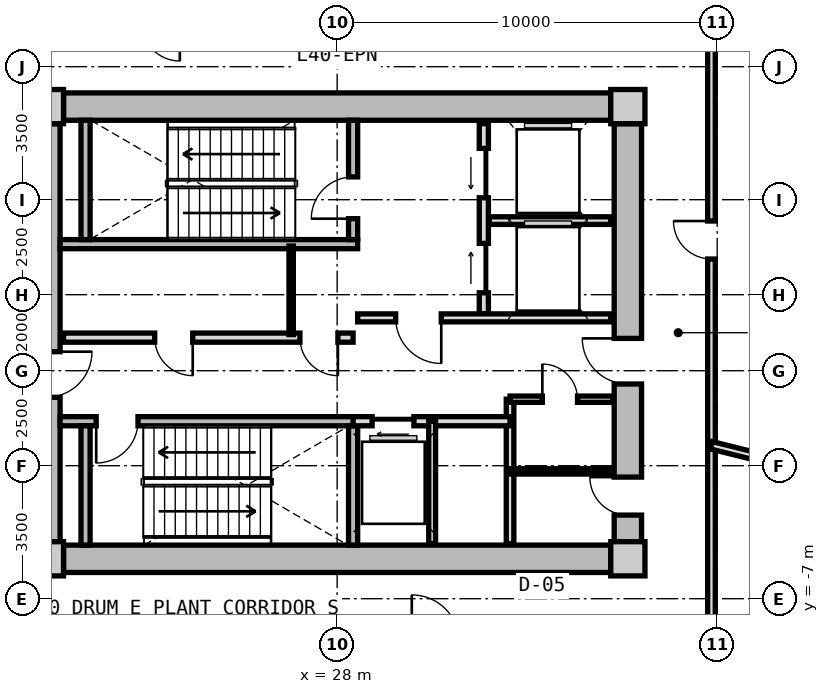
"""IFC4 building model, lengths in metres.
Left out: names, types, materials, properties, quantities, classifications, styles, units other than length and angle.
Written with IfcOpenShell. Run it as: python <this file> out.ifc"""

import sys

from ifc_helpers import new_model, si_unit, direction, frame, frame_2d, origin, origin_2d, place, context, subcontext, project, spatial, rectangle, extrude, source, transform, mapped, element, fill, save


model = new_model("IFC4")
c1 = context("Model", 3, precision=1e-05, world=origin(), true_north=direction((0.0, 1.0)))
c2 = subcontext(c1, "Body", "Model", "MODEL_VIEW")
j1 = project(units=[si_unit("LENGTHUNIT", "METRE"), si_unit("PLANEANGLEUNIT", "RADIAN")], contexts=[c1])
p1 = place(None, origin())
s1 = spatial("IfcSite", under=j1, at=p1, CompositionType="ELEMENT")
p2 = place(p1, origin())
s2 = spatial("IfcBuilding", under=s1, at=p2, CompositionType="ELEMENT")
p3 = place(p2, frame((0.0, 0.0, 129.8)))
s3 = spatial("IfcBuildingStorey", under=s2, at=p3, CompositionType="ELEMENT", Elevation=129.8)
m1 = source(origin(), c2, "Body", "SweptSolid", [
    extrude(rectangle(XDim=0.9, YDim=0.9, at=origin_2d()), origin(), (0.0, 0.0, 1.0), 4.5),
])
for number, where, z_axis, x_axis in (
    (1, (20.35, -5.95, 0.0), (0.0, 0.0, 1.0), (1.0, 0.0, 0.0)),
    (2, (35.65, -5.95, 0.0), (0.0, 0.0, 1.0), (1.0, 0.0, 0.0)),
    (3, (35.65, 5.95, 0.0), (0.0, 0.0, 1.0), (1.0, 0.0, 0.0)),
    (4, (20.35, 5.95, 0.0), (0.0, 0.0, 1.0), (1.0, 0.0, 0.0)),
):
    element("IfcColumn", number, at=place(p3, frame(where, z_axis=z_axis, x_axis=x_axis)), inside=s3, PredefinedType="COLUMN", context=c2, shape_type="MappedRepresentation", body=[
        mapped(m1, transform((0.0, 0.0, 0.0), x_axis=(1.0, 0.0, 0.0), y_axis=(0.0, 1.0, 0.0), z_axis=(0.0, 0.0, 1.0), scale=1.0)),
    ])
m2 = source(origin(), c2, "Body", "SweptSolid", [
    extrude(rectangle(XDim=14.4, YDim=0.72, at=frame_2d((7.2, 0.0))), origin(), (0.0, 0.0, 1.0), 4.08),
])
for number, where, z_axis, x_axis in (
    (5, (20.8, 5.95, 0.0), (0.0, 0.0, 1.0), (1.0, 0.0, 0.0)),
    (6, (35.2, -5.95, 0.0), (0.0, 0.0, 1.0), (-1.0, 0.0, 0.0)),
):
    element("IfcWall", number, at=place(p3, frame(where, z_axis=z_axis, x_axis=x_axis)), inside=s3, PredefinedType="SHEAR", context=c2, shape_type="MappedRepresentation", body=[
        mapped(m2, transform((0.0, 0.0, 0.0), x_axis=(1.0, 0.0, 0.0), y_axis=(0.0, 1.0, 0.0), z_axis=(0.0, 0.0, 1.0), scale=1.0)),
    ])
m3 = source(origin(), c2, "Body", "SweptSolid", [
    extrude(rectangle(XDim=11.0, YDim=0.72, at=frame_2d((5.5, 0.0))), origin(), (0.0, 0.0, 1.0), 4.08),
])
p4 = place(p3, frame((20.35, -5.5, 0.0), z_axis=(0.0, 0.0, 1.0), x_axis=(0.0, 1.0, 0.0)))
e7 = element("IfcWall", 7, at=p4, inside=s3, PredefinedType="SHEAR", context=c2, shape_type="MappedRepresentation", body=[
    mapped(m3, transform((0.0, 0.0, 0.0), x_axis=(1.0, 0.0, 0.0), y_axis=(0.0, 1.0, 0.0), z_axis=(0.0, 0.0, 1.0), scale=1.0)),
])
p5 = place(p4, frame((3.8, 0.0, 0.0)))
e8 = element("IfcOpeningElement", 8, at=p5, cuts=e7, PredefinedType="OPENING", context=c2, shape_type="SweptSolid", body=[
    extrude(rectangle(XDim=1.2, YDim=2.15, at=frame_2d((0.6, 1.075))), frame((0.0, 0.37, 0.0), z_axis=(0.0, -1.0, 0.0), x_axis=(1.0, 0.0, 0.0)), (0.0, 0.0, 1.0), 0.74),
])
p6 = place(p3, frame((35.65, 5.5, 0.0), z_axis=(0.0, 0.0, 1.0), x_axis=(0.0, -1.0, 0.0)))
e9 = element("IfcWall", 9, at=p6, inside=s3, PredefinedType="SHEAR", context=c2, shape_type="MappedRepresentation", body=[
    mapped(m3, transform((0.0, 0.0, 0.0), x_axis=(1.0, 0.0, 0.0), y_axis=(0.0, 1.0, 0.0), z_axis=(0.0, 0.0, 1.0), scale=1.0)),
])
p7 = place(p6, frame((5.65, 0.0, 0.0)))
e10 = element("IfcOpeningElement", 10, at=p7, cuts=e9, PredefinedType="OPENING", context=c2, shape_type="SweptSolid", body=[
    extrude(rectangle(XDim=1.2, YDim=2.15, at=frame_2d((0.6, 1.075))), frame((0.0, 0.37, 0.0), z_axis=(0.0, -1.0, 0.0), x_axis=(1.0, 0.0, 0.0)), (0.0, 0.0, 1.0), 0.74),
])
p8 = place(p6, frame((9.3, 0.0, 0.0)))
e11 = element("IfcOpeningElement", 11, at=p8, cuts=e9, PredefinedType="OPENING", context=c2, shape_type="SweptSolid", body=[
    extrude(rectangle(XDim=1.0, YDim=2.1, at=frame_2d((0.5, 1.05))), frame((0.0, 0.37, 0.0), z_axis=(0.0, -1.0, 0.0), x_axis=(1.0, 0.0, 0.0)), (0.0, 0.0, 1.0), 0.74),
])
m4 = source(origin(), c2, "Body", "SweptSolid", [
    extrude(rectangle(XDim=7.83, YDim=0.24, at=frame_2d((3.915, 0.0))), origin(), (0.0, 0.0, 1.0), 4.08),
])
p9 = place(p3, frame((20.71, 2.33, 0.0), z_axis=(0.0, 0.0, 1.0), x_axis=(1.0, 0.0, 0.0)))
e12 = element("IfcWall", 12, at=p9, inside=s3, PredefinedType="PARTITIONING", context=c2, shape_type="MappedRepresentation", body=[
    mapped(m4, transform((0.0, 0.0, 0.0), x_axis=(1.0, 0.0, 0.0), y_axis=(0.0, 1.0, 0.0), z_axis=(0.0, 0.0, 1.0), scale=1.0)),
])
m5 = source(origin(), c2, "Body", "SweptSolid", [
    extrude(rectangle(XDim=3.14, YDim=0.24, at=frame_2d((1.57, 0.0))), origin(), (0.0, 0.0, 1.0), 4.08),
])
p10 = place(p3, frame((21.38, 2.45, 0.0), z_axis=(0.0, 0.0, 1.0), x_axis=(0.0, 1.0, 0.0)))
e13 = element("IfcWall", 13, at=p10, inside=s3, PredefinedType="PARTITIONING", context=c2, shape_type="MappedRepresentation", body=[
    mapped(m5, transform((0.0, 0.0, 0.0), x_axis=(1.0, 0.0, 0.0), y_axis=(0.0, 1.0, 0.0), z_axis=(0.0, 0.0, 1.0), scale=1.0)),
])
p11 = place(p3, frame((28.42, 2.45, 0.0), z_axis=(0.0, 0.0, 1.0), x_axis=(0.0, 1.0, 0.0)))
e14 = element("IfcWall", 14, at=p11, inside=s3, PredefinedType="PARTITIONING", context=c2, shape_type="MappedRepresentation", body=[
    mapped(m5, transform((0.0, 0.0, 0.0), x_axis=(1.0, 0.0, 0.0), y_axis=(0.0, 1.0, 0.0), z_axis=(0.0, 0.0, 1.0), scale=1.0)),
])
p12 = place(p11, frame((0.55, 0.0, 0.0)))
e15 = element("IfcOpeningElement", 15, at=p12, cuts=e14, PredefinedType="OPENING", context=c2, shape_type="SweptSolid", body=[
    extrude(rectangle(XDim=1.1, YDim=2.15, at=frame_2d((0.55, 1.075))), frame((0.0, 0.13, 0.0), z_axis=(0.0, -1.0, 0.0), x_axis=(1.0, 0.0, 0.0)), (0.0, 0.0, 1.0), 0.26),
])
p13 = place(p3, frame((20.71, -2.33, 0.0), z_axis=(0.0, 0.0, 1.0), x_axis=(1.0, 0.0, 0.0)))
e16 = element("IfcWall", 16, at=p13, inside=s3, PredefinedType="PARTITIONING", context=c2, shape_type="MappedRepresentation", body=[
    mapped(m4, transform((0.0, 0.0, 0.0), x_axis=(1.0, 0.0, 0.0), y_axis=(0.0, 1.0, 0.0), z_axis=(0.0, 0.0, 1.0), scale=1.0)),
])
p14 = place(p13, frame((0.95, 0.0, 0.0)))
e17 = element("IfcOpeningElement", 17, at=p14, cuts=e16, PredefinedType="OPENING", context=c2, shape_type="SweptSolid", body=[
    extrude(rectangle(XDim=1.1, YDim=2.15, at=frame_2d((0.55, 1.075))), frame((0.0, 0.13, 0.0), z_axis=(0.0, -1.0, 0.0), x_axis=(1.0, 0.0, 0.0)), (0.0, 0.0, 1.0), 0.26),
])
for number, where, z_axis, x_axis in (
    (18, (21.38, -5.59, 0.0), (0.0, 0.0, 1.0), (0.0, 1.0, 0.0)),
    (19, (28.42, -5.59, 0.0), (0.0, 0.0, 1.0), (0.0, 1.0, 0.0)),
):
    element("IfcWall", number, at=place(p3, frame(where, z_axis=z_axis, x_axis=x_axis)), inside=s3, PredefinedType="PARTITIONING", context=c2, shape_type="MappedRepresentation", body=[
        mapped(m5, transform((0.0, 0.0, 0.0), x_axis=(1.0, 0.0, 0.0), y_axis=(0.0, 1.0, 0.0), z_axis=(0.0, 0.0, 1.0), scale=1.0)),
    ])
m6 = source(origin(), c2, "Body", "SweptSolid", [
    extrude(rectangle(XDim=5.0, YDim=0.24, at=frame_2d((2.5, 0.0))), origin(), (0.0, 0.0, 1.0), 4.065),
])
p15 = place(p3, frame((31.86, 0.5, 0.0), z_axis=(0.0, 0.0, 1.0), x_axis=(0.0, 1.0, 0.0)))
e20 = element("IfcWall", 20, at=p15, inside=s3, PredefinedType="PARTITIONING", context=c2, shape_type="MappedRepresentation", body=[
    mapped(m6, transform((0.0, 0.0, 0.0), x_axis=(1.0, 0.0, 0.0), y_axis=(0.0, 1.0, 0.0), z_axis=(0.0, 0.0, 1.0), scale=1.0)),
])
p16 = place(p15, frame((3.05, 0.0, 0.0)))
e21 = element("IfcOpeningElement", 21, at=p16, cuts=e20, PredefinedType="OPENING", context=c2, shape_type="SweptSolid", body=[
    extrude(rectangle(XDim=1.3, YDim=2.2, at=frame_2d((0.65, 1.1))), frame((0.0, 0.13, 0.0), z_axis=(0.0, -1.0, 0.0), x_axis=(1.0, 0.0, 0.0)), (0.0, 0.0, 1.0), 0.26),
])
p17 = place(p15, frame((0.55, 0.0, 0.0)))
e22 = element("IfcOpeningElement", 22, at=p17, cuts=e20, PredefinedType="OPENING", context=c2, shape_type="SweptSolid", body=[
    extrude(rectangle(XDim=1.3, YDim=2.2, at=frame_2d((0.65, 1.1))), frame((0.0, 0.13, 0.0), z_axis=(0.0, -1.0, 0.0), x_axis=(1.0, 0.0, 0.0)), (0.0, 0.0, 1.0), 0.26),
])
m7 = source(origin(), c2, "Body", "SweptSolid", [
    extrude(rectangle(XDim=3.2, YDim=0.2, at=frame_2d((1.6, 0.0))), origin(), (0.0, 0.0, 1.0), 4.065),
])
p18 = place(p3, frame((32.0, 2.95, 0.0), z_axis=(0.0, 0.0, 1.0), x_axis=(1.0, 0.0, 0.0)))
e23 = element("IfcWall", 23, at=p18, inside=s3, PredefinedType="PARTITIONING", context=c2, shape_type="MappedRepresentation", body=[
    mapped(m7, transform((0.0, 0.0, 0.0), x_axis=(1.0, 0.0, 0.0), y_axis=(0.0, 1.0, 0.0), z_axis=(0.0, 0.0, 1.0), scale=1.0)),
])
m8 = source(origin(), c2, "Body", "SweptSolid", [
    extrude(rectangle(XDim=6.66, YDim=0.21, at=frame_2d((3.33, 0.0))), origin(), (0.0, 0.0, 1.0), 4.065),
])
p19 = place(p3, frame((28.54, 0.39, 0.0), z_axis=(0.0, 0.0, 1.0), x_axis=(1.0, 0.0, 0.0)))
e24 = element("IfcWall", 24, at=p19, inside=s3, PredefinedType="PARTITIONING", context=c2, shape_type="MappedRepresentation", body=[
    mapped(m8, transform((0.0, 0.0, 0.0), x_axis=(1.0, 0.0, 0.0), y_axis=(0.0, 1.0, 0.0), z_axis=(0.0, 0.0, 1.0), scale=1.0)),
])
p20 = place(p19, frame((1.0, 0.0, 0.0)))
e25 = element("IfcOpeningElement", 25, at=p20, cuts=e24, PredefinedType="OPENING", context=c2, shape_type="SweptSolid", body=[
    extrude(rectangle(XDim=1.2, YDim=2.15, at=frame_2d((0.6, 1.075))), frame((0.0, 0.115, 0.0), z_axis=(0.0, -1.0, 0.0), x_axis=(1.0, 0.0, 0.0)), (0.0, 0.0, 1.0), 0.23),
])
m9 = source(origin(), c2, "Body", "SweptSolid", [
    extrude(rectangle(XDim=7.62, YDim=0.24, at=frame_2d((3.81, 0.0))), origin(), (0.0, 0.0, 1.0), 4.065),
])
p21 = place(p3, frame((20.8, -0.13, 0.0), z_axis=(0.0, 0.0, 1.0), x_axis=(1.0, 0.0, 0.0)))
e26 = element("IfcWall", 26, at=p21, inside=s3, PredefinedType="PARTITIONING", context=c2, shape_type="MappedRepresentation", body=[
    mapped(m9, transform((0.0, 0.0, 0.0), x_axis=(1.0, 0.0, 0.0), y_axis=(0.0, 1.0, 0.0), z_axis=(0.0, 0.0, 1.0), scale=1.0)),
])
p22 = place(p21, frame((6.22, 0.0, 0.0)))
e27 = element("IfcOpeningElement", 27, at=p22, cuts=e26, PredefinedType="OPENING", context=c2, shape_type="SweptSolid", body=[
    extrude(rectangle(XDim=1.0, YDim=2.1, at=frame_2d((0.5, 1.05))), frame((0.0, 0.13, 0.0), z_axis=(0.0, -1.0, 0.0), x_axis=(1.0, 0.0, 0.0)), (0.0, 0.0, 1.0), 0.26),
])
p23 = place(p21, frame((2.4, 0.0, 0.0)))
e28 = element("IfcOpeningElement", 28, at=p23, cuts=e26, PredefinedType="OPENING", context=c2, shape_type="SweptSolid", body=[
    extrude(rectangle(XDim=1.0, YDim=2.1, at=frame_2d((0.5, 1.05))), frame((0.0, 0.13, 0.0), z_axis=(0.0, -1.0, 0.0), x_axis=(1.0, 0.0, 0.0)), (0.0, 0.0, 1.0), 0.26),
])
m10 = source(origin(), c2, "Body", "SweptSolid", [
    extrude(rectangle(XDim=2.33, YDim=0.115, at=frame_2d((1.165, 0.0))), origin(), (0.0, 0.0, 1.0), 4.065),
])
p24 = place(p3, frame((26.79, -0.05, 0.0), z_axis=(0.0, 0.0, 1.0), x_axis=(0.0, 1.0, 0.0)))
e29 = element("IfcWall", 29, at=p24, inside=s3, PredefinedType="PARTITIONING", context=c2, shape_type="MappedRepresentation", body=[
    mapped(m10, transform((0.0, 0.0, 0.0), x_axis=(1.0, 0.0, 0.0), y_axis=(0.0, 1.0, 0.0), z_axis=(0.0, 0.0, 1.0), scale=1.0)),
])
m11 = source(origin(), c2, "Body", "SweptSolid", [
    extrude(rectangle(XDim=3.8, YDim=0.2, at=frame_2d((1.9, 0.0))), origin(), (0.0, 0.0, 1.0), 4.065),
])
p25 = place(p3, frame((32.55, -5.55, 0.0), z_axis=(0.0, 0.0, 1.0), x_axis=(0.0, 1.0, 0.0)))
e30 = element("IfcWall", 30, at=p25, inside=s3, PredefinedType="PARTITIONING", context=c2, shape_type="MappedRepresentation", body=[
    mapped(m11, transform((0.0, 0.0, 0.0), x_axis=(1.0, 0.0, 0.0), y_axis=(0.0, 1.0, 0.0), z_axis=(0.0, 0.0, 1.0), scale=1.0)),
])
m12 = source(origin(), c2, "Body", "SweptSolid", [
    extrude(rectangle(XDim=4.13, YDim=0.24, at=frame_2d((2.065, 0.0))), origin(), (0.0, 0.0, 1.0), 4.065),
])
p26 = place(p3, frame((28.42, -2.33, 0.0), z_axis=(0.0, 0.0, 1.0), x_axis=(1.0, 0.0, 0.0)))
e31 = element("IfcWall", 31, at=p26, inside=s3, PredefinedType="PARTITIONING", context=c2, shape_type="MappedRepresentation", body=[
    mapped(m12, transform((0.0, 0.0, 0.0), x_axis=(1.0, 0.0, 0.0), y_axis=(0.0, 1.0, 0.0), z_axis=(0.0, 0.0, 1.0), scale=1.0)),
])
p27 = place(p26, frame((0.5, 0.0, 0.0)))
e32 = element("IfcOpeningElement", 32, at=p27, cuts=e31, PredefinedType="OPENING", context=c2, shape_type="SweptSolid", body=[
    extrude(rectangle(XDim=1.1, YDim=2.2, at=frame_2d((0.55, 1.1))), frame((0.0, 0.13, 0.0), z_axis=(0.0, -1.0, 0.0), x_axis=(1.0, 0.0, 0.0)), (0.0, 0.0, 1.0), 0.26),
])
m13 = source(origin(), c2, "Body", "SweptSolid", [
    extrude(rectangle(XDim=3.22, YDim=0.18, at=frame_2d((1.61, 0.0))), origin(), (0.0, 0.0, 1.0), 4.065),
])
p28 = place(p3, frame((30.5, -5.55, 0.0), z_axis=(0.0, 0.0, 1.0), x_axis=(0.0, 1.0, 0.0)))
e33 = element("IfcWall", 33, at=p28, inside=s3, PredefinedType="PARTITIONING", context=c2, shape_type="MappedRepresentation", body=[
    mapped(m13, transform((0.0, 0.0, 0.0), x_axis=(1.0, 0.0, 0.0), y_axis=(0.0, 1.0, 0.0), z_axis=(0.0, 0.0, 1.0), scale=1.0)),
])
m14 = source(origin(), c2, "Body", "SweptSolid", [
    extrude(rectangle(XDim=2.7, YDim=0.165, at=frame_2d((1.35, 0.0))), origin(), (0.0, 0.0, 1.0), 4.065),
])
p29 = place(p3, frame((32.55, -1.75, 0.0), z_axis=(0.0, 0.0, 1.0), x_axis=(1.0, 0.0, 0.0)))
e34 = element("IfcWall", 34, at=p29, inside=s3, PredefinedType="PARTITIONING", context=c2, shape_type="MappedRepresentation", body=[
    mapped(m14, transform((0.0, 0.0, 0.0), x_axis=(1.0, 0.0, 0.0), y_axis=(0.0, 1.0, 0.0), z_axis=(0.0, 0.0, 1.0), scale=1.0)),
])
p30 = place(p29, frame((0.85, 0.0, 0.0)))
e35 = element("IfcOpeningElement", 35, at=p30, cuts=e34, PredefinedType="OPENING", context=c2, shape_type="SweptSolid", body=[
    extrude(rectangle(XDim=0.925, YDim=2.1, at=frame_2d((0.462, 1.05))), frame((0.0, 0.093, 0.0), z_axis=(0.0, -1.0, 0.0), x_axis=(1.0, 0.0, 0.0)), (0.0, 0.0, 1.0), 0.185),
])
m15 = source(origin(), c2, "Body", "SweptSolid", [
    extrude(rectangle(XDim=2.7, YDim=0.14, at=frame_2d((1.35, 0.0))), origin(), (0.0, 0.0, 1.0), 4.065),
])
p31 = place(p3, frame((32.55, -3.65, 0.0), z_axis=(0.0, 0.0, 1.0), x_axis=(1.0, 0.0, 0.0)))
e36 = element("IfcWall", 36, at=p31, inside=s3, PredefinedType="PARTITIONING", context=c2, shape_type="MappedRepresentation", body=[
    mapped(m15, transform((0.0, 0.0, 0.0), x_axis=(1.0, 0.0, 0.0), y_axis=(0.0, 1.0, 0.0), z_axis=(0.0, 0.0, 1.0), scale=1.0)),
])
m16 = source(origin(), c2, "Body", "SweptSolid", [
    extrude(rectangle(XDim=16.3, YDim=0.2, at=frame_2d((8.15, 0.0))), origin(), (0.0, 0.0, 1.0), 4.065),
])
p32 = place(p3, frame((37.85, 8.15, 0.0), z_axis=(0.0, 0.0, 1.0), x_axis=(0.0, -1.0, 0.0)))
e37 = element("IfcWall", 37, at=p32, inside=s3, PredefinedType="PARTITIONING", context=c2, shape_type="MappedRepresentation", body=[
    mapped(m16, transform((0.0, 0.0, 0.0), x_axis=(1.0, 0.0, 0.0), y_axis=(0.0, 1.0, 0.0), z_axis=(0.0, 0.0, 1.0), scale=1.0)),
])
p33 = place(p32, frame((5.211, 0.0, 0.0)))
e38 = element("IfcOpeningElement", 38, at=p33, cuts=e37, PredefinedType="OPENING", context=c2, shape_type="SweptSolid", body=[
    extrude(rectangle(XDim=1.0, YDim=2.1, at=frame_2d((0.5, 1.05))), frame((0.0, 0.11, 0.0), z_axis=(0.0, -1.0, 0.0), x_axis=(1.0, 0.0, 0.0)), (0.0, 0.0, 1.0), 0.22),
])
m17 = source(origin(), c2, "Body", "SweptSolid", [
    extrude(rectangle(XDim=6.052, YDim=0.2, at=frame_2d((3.026, 0.0))), origin(), (0.0, 0.0, 1.0), 4.065),
])
p34 = place(p3, frame((37.85, -2.963, 0.0), z_axis=(0.0, 0.0, 1.0), x_axis=(0.970369863069, -0.24162435483, 0.0)))
e39 = element("IfcWall", 39, at=p34, inside=s3, PredefinedType="PARTITIONING", context=c2, shape_type="MappedRepresentation", body=[
    mapped(m17, transform((0.0, 0.0, 0.0), x_axis=(1.0, 0.0, 0.0), y_axis=(0.0, 1.0, 0.0), z_axis=(0.0, 0.0, 1.0), scale=1.0)),
])
m18 = source(origin(), c2, "Body", "SweptSolid", [
    extrude(rectangle(XDim=1.1, YDim=2.15, at=frame_2d((0.55, 1.075))), frame((0.0, 0.025, 0.0), z_axis=(0.0, -1.0, 0.0), x_axis=(1.0, 0.0, 0.0)), (0.0, 0.0, 1.0), 0.05),
])
p35 = place(p12, origin())
e40 = element("IfcDoor", 40, at=p35, inside=s3, OperationType="SINGLE_SWING_LEFT", PredefinedType="DOOR", context=c2, shape_type="MappedRepresentation", body=[
    mapped(m18, transform((0.0, 0.0, 0.0), x_axis=(1.0, 0.0, 0.0), y_axis=(0.0, 1.0, 0.0), z_axis=(0.0, 0.0, 1.0), scale=1.0)),
])
fill(e15, e40)
p36 = place(p14, frame((1.1, 0.0, 0.0), z_axis=(0.0, 0.0, 1.0), x_axis=(-1.0, 0.0, 0.0)))
e41 = element("IfcDoor", 41, at=p36, inside=s3, OperationType="SINGLE_SWING_RIGHT", PredefinedType="DOOR", context=c2, shape_type="MappedRepresentation", body=[
    mapped(m18, transform((0.0, 0.0, 0.0), x_axis=(1.0, 0.0, 0.0), y_axis=(0.0, 1.0, 0.0), z_axis=(0.0, 0.0, 1.0), scale=1.0)),
])
fill(e17, e41)
m19 = source(origin(), c2, "Body", "SweptSolid", [
    extrude(rectangle(XDim=1.3, YDim=2.2, at=frame_2d((0.65, 1.1))), frame((0.0, 0.025, 0.0), z_axis=(0.0, -1.0, 0.0), x_axis=(1.0, 0.0, 0.0)), (0.0, 0.0, 1.0), 0.05),
])
p37 = place(p16, origin())
e42 = element("IfcDoor", 42, at=p37, inside=s3, OperationType="SLIDING_TO_LEFT", PredefinedType="DOOR", context=c2, shape_type="MappedRepresentation", body=[
    mapped(m19, transform((0.0, 0.0, 0.0), x_axis=(1.0, 0.0, 0.0), y_axis=(0.0, 1.0, 0.0), z_axis=(0.0, 0.0, 1.0), scale=1.0)),
])
fill(e21, e42)
p38 = place(p17, origin())
e43 = element("IfcDoor", 43, at=p38, inside=s3, OperationType="SLIDING_TO_RIGHT", PredefinedType="DOOR", context=c2, shape_type="MappedRepresentation", body=[
    mapped(m19, transform((0.0, 0.0, 0.0), x_axis=(1.0, 0.0, 0.0), y_axis=(0.0, 1.0, 0.0), z_axis=(0.0, 0.0, 1.0), scale=1.0)),
])
fill(e22, e43)
m20 = source(origin(), c2, "Body", "SweptSolid", [
    extrude(rectangle(XDim=1.2, YDim=2.15, at=frame_2d((0.6, 1.075))), frame((0.0, 0.025, 0.0), z_axis=(0.0, -1.0, 0.0), x_axis=(1.0, 0.0, 0.0)), (0.0, 0.0, 1.0), 0.05),
])
p39 = place(p20, frame((1.2, 0.0, 0.0), z_axis=(0.0, 0.0, 1.0), x_axis=(-1.0, 0.0, 0.0)))
e44 = element("IfcDoor", 44, at=p39, inside=s3, OperationType="SINGLE_SWING_LEFT", PredefinedType="DOOR", context=c2, shape_type="MappedRepresentation", body=[
    mapped(m20, transform((0.0, 0.0, 0.0), x_axis=(1.0, 0.0, 0.0), y_axis=(0.0, 1.0, 0.0), z_axis=(0.0, 0.0, 1.0), scale=1.0)),
])
fill(e25, e44)
p40 = place(p7, frame((1.2, 0.0, 0.0), z_axis=(0.0, 0.0, 1.0), x_axis=(-1.0, 0.0, 0.0)))
e45 = element("IfcDoor", 45, at=p40, inside=s3, OperationType="SINGLE_SWING_RIGHT", PredefinedType="DOOR", context=c2, shape_type="MappedRepresentation", body=[
    mapped(m20, transform((0.0, 0.0, 0.0), x_axis=(1.0, 0.0, 0.0), y_axis=(0.0, 1.0, 0.0), z_axis=(0.0, 0.0, 1.0), scale=1.0)),
])
fill(e10, e45)
m21 = source(origin(), c2, "Body", "SweptSolid", [
    extrude(rectangle(XDim=1.0, YDim=2.1, at=frame_2d((0.5, 1.05))), frame((0.0, 0.025, 0.0), z_axis=(0.0, -1.0, 0.0), x_axis=(1.0, 0.0, 0.0)), (0.0, 0.0, 1.0), 0.05),
])
p41 = place(p22, frame((1.0, 0.0, 0.0), z_axis=(0.0, 0.0, 1.0), x_axis=(-1.0, 0.0, 0.0)))
e46 = element("IfcDoor", 46, at=p41, inside=s3, OperationType="SINGLE_SWING_LEFT", PredefinedType="DOOR", context=c2, shape_type="MappedRepresentation", body=[
    mapped(m21, transform((0.0, 0.0, 0.0), x_axis=(1.0, 0.0, 0.0), y_axis=(0.0, 1.0, 0.0), z_axis=(0.0, 0.0, 1.0), scale=1.0)),
])
fill(e27, e46)
p42 = place(p23, frame((1.0, 0.0, 0.0), z_axis=(0.0, 0.0, 1.0), x_axis=(-1.0, 0.0, 0.0)))
e47 = element("IfcDoor", 47, at=p42, inside=s3, OperationType="SINGLE_SWING_LEFT", PredefinedType="DOOR", context=c2, shape_type="MappedRepresentation", body=[
    mapped(m21, transform((0.0, 0.0, 0.0), x_axis=(1.0, 0.0, 0.0), y_axis=(0.0, 1.0, 0.0), z_axis=(0.0, 0.0, 1.0), scale=1.0)),
])
fill(e28, e47)
m22 = source(origin(), c2, "Body", "SweptSolid", [
    extrude(rectangle(XDim=1.1, YDim=2.2, at=frame_2d((0.55, 1.1))), frame((0.0, 0.025, 0.0), z_axis=(0.0, -1.0, 0.0), x_axis=(1.0, 0.0, 0.0)), (0.0, 0.0, 1.0), 0.05),
])
p43 = place(p27, frame((1.1, 0.0, 0.0), z_axis=(0.0, 0.0, 1.0), x_axis=(-1.0, 0.0, 0.0)))
e48 = element("IfcDoor", 48, at=p43, inside=s3, OperationType="SLIDING_TO_LEFT", PredefinedType="DOOR", context=c2, shape_type="MappedRepresentation", body=[
    mapped(m22, transform((0.0, 0.0, 0.0), x_axis=(1.0, 0.0, 0.0), y_axis=(0.0, 1.0, 0.0), z_axis=(0.0, 0.0, 1.0), scale=1.0)),
])
fill(e32, e48)
m23 = source(origin(), c2, "Body", "SweptSolid", [
    extrude(rectangle(XDim=0.925, YDim=2.1, at=frame_2d((0.462, 1.05))), frame((0.0, 0.025, 0.0), z_axis=(0.0, -1.0, 0.0), x_axis=(1.0, 0.0, 0.0)), (0.0, 0.0, 1.0), 0.05),
])
p44 = place(p30, origin())
e49 = element("IfcDoor", 49, at=p44, inside=s3, OperationType="SINGLE_SWING_LEFT", PredefinedType="DOOR", context=c2, shape_type="MappedRepresentation", body=[
    mapped(m23, transform((0.0, 0.0, 0.0), x_axis=(1.0, 0.0, 0.0), y_axis=(0.0, 1.0, 0.0), z_axis=(0.0, 0.0, 1.0), scale=1.0)),
])
fill(e35, e49)
p45 = place(p8, frame((1.0, 0.0, 0.0), z_axis=(0.0, 0.0, 1.0), x_axis=(-1.0, 0.0, 0.0)))
e50 = element("IfcDoor", 50, at=p45, inside=s3, OperationType="SINGLE_SWING_RIGHT", PredefinedType="DOOR", context=c2, shape_type="MappedRepresentation", body=[
    mapped(m21, transform((0.0, 0.0, 0.0), x_axis=(1.0, 0.0, 0.0), y_axis=(0.0, 1.0, 0.0), z_axis=(0.0, 0.0, 1.0), scale=1.0)),
])
fill(e11, e50)
p46 = place(p33, frame((1.0, 0.0, 0.0), z_axis=(0.0, 0.0, 1.0), x_axis=(-1.0, 0.0, 0.0)))
e51 = element("IfcDoor", 51, at=p46, inside=s3, OperationType="SINGLE_SWING_RIGHT", PredefinedType="DOOR", context=c2, shape_type="MappedRepresentation", body=[
    mapped(m21, transform((0.0, 0.0, 0.0), x_axis=(1.0, 0.0, 0.0), y_axis=(0.0, 1.0, 0.0), z_axis=(0.0, 0.0, 1.0), scale=1.0)),
])
fill(e38, e51)
save(model, sys.argv[1])
